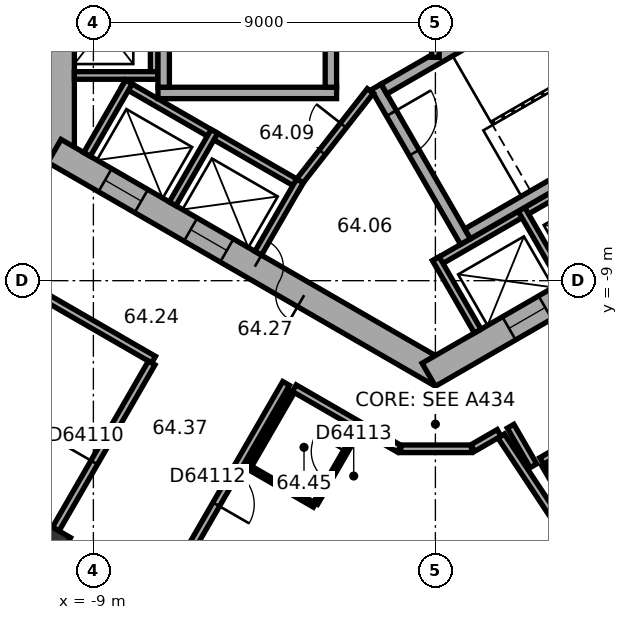
"""IFC4 building model, lengths in metres.
Left out: names, types, materials, properties, quantities, classifications, styles, units other than length and angle.
Written with IfcOpenShell. Run it as: python <this file> out.ifc"""

import sys

from ifc_helpers import new_model, si_unit, direction, frame, frame_2d, origin, origin_2d, place, context, subcontext, project, spatial, rectangle, extrude, element, fill, save


model = new_model("IFC4")
c1 = context("Model", 3, precision=1e-05, world=origin(), true_north=direction((0.0, 1.0)))
c2 = subcontext(c1, "Body", "Model", "MODEL_VIEW")
j1 = project(units=[si_unit("LENGTHUNIT", "METRE"), si_unit("PLANEANGLEUNIT", "RADIAN")], contexts=[c1])
p1 = place(None, origin())
s1 = spatial("IfcSite", under=j1, at=p1, CompositionType="ELEMENT")
p2 = place(p1, origin())
s2 = spatial("IfcBuilding", under=s1, at=p2, CompositionType="ELEMENT")
p3 = place(p2, frame((0.0, 0.0, 259.8)))
s3 = spatial("IfcBuildingStorey", under=s2, at=p3, CompositionType="ELEMENT", Elevation=259.8)
p4 = place(p3, frame((-10.165, -15.84, 0.0), z_axis=(0.0, 0.0, 1.0), x_axis=(0.866025403784, -0.5, 0.0)))
e1 = element("IfcColumn", 1, at=p4, inside=s3, PredefinedType="COLUMN", context=c2, shape_type="SweptSolid", body=[
    extrude(rectangle(XDim=0.9, YDim=0.7, at=origin_2d()), origin(), (0.0, 0.0, 1.0), 3.7),
])
p5 = place(p3, frame((-9.85, 5.889, 0.0), z_axis=(0.0, 0.0, 1.0), x_axis=(0.0, -1.0, 0.0)))
e2 = element("IfcWall", 2, at=p5, inside=s3, PredefinedType="SHEAR", context=c2, shape_type="SweptSolid", body=[
    extrude(rectangle(XDim=11.778, YDim=0.7, at=frame_2d((5.889, 0.0))), origin(), (0.0, 0.0, 1.0), 3.7),
])
p6 = place(p5, frame((5.039, 0.0, 0.0)))
e3 = element("IfcOpeningElement", 3, at=p6, cuts=e2, PredefinedType="OPENING", context=c2, shape_type="SweptSolid", body=[
    extrude(rectangle(XDim=1.1, YDim=2.1, at=frame_2d((0.55, 1.05))), frame((0.0, 0.36, 0.0), z_axis=(0.0, -1.0, 0.0), x_axis=(1.0, 0.0, 0.0)), (0.0, 0.0, 1.0), 0.72),
])
p7 = place(p5, frame((7.639, 0.0, 0.0)))
e4 = element("IfcOpeningElement", 4, at=p7, cuts=e2, PredefinedType="OPENING", context=c2, shape_type="SweptSolid", body=[
    extrude(rectangle(XDim=1.1, YDim=2.1, at=frame_2d((0.55, 1.05))), frame((0.0, 0.36, 0.0), z_axis=(0.0, -1.0, 0.0), x_axis=(1.0, 0.0, 0.0)), (0.0, 0.0, 1.0), 0.72),
])
p8 = place(p3, frame((-10.025, -5.586, 0.0), z_axis=(0.0, 0.0, 1.0), x_axis=(0.866026453023, -0.499998182661, 0.0)))
e5 = element("IfcWall", 5, at=p8, inside=s3, PredefinedType="SHEAR", context=c2, shape_type="SweptSolid", body=[
    extrude(rectangle(XDim=11.778, YDim=0.7, at=frame_2d((5.889, 0.0))), origin(), (0.0, 0.0, 1.0), 3.7),
])
p9 = place(p8, frame((6.089, 0.0, 0.0)))
e6 = element("IfcOpeningElement", 6, at=p9, cuts=e5, PredefinedType="OPENING", context=c2, shape_type="SweptSolid", body=[
    extrude(rectangle(XDim=1.5, YDim=2.1, at=frame_2d((0.75, 1.05))), frame((0.0, 0.36, 0.0), z_axis=(0.0, -1.0, 0.0), x_axis=(1.0, 0.0, 0.0)), (0.0, 0.0, 1.0), 0.72),
])
p10 = place(p8, frame((1.539, 0.0, 0.0)))
e7 = element("IfcOpeningElement", 7, at=p10, cuts=e5, PredefinedType="OPENING", context=c2, shape_type="SweptSolid", body=[
    extrude(rectangle(XDim=1.1, YDim=2.1, at=frame_2d((0.55, 1.05))), frame((0.0, 0.36, 0.0), z_axis=(0.0, -1.0, 0.0), x_axis=(1.0, 0.0, 0.0)), (0.0, 0.0, 1.0), 0.72),
])
p11 = place(p8, frame((4.139, 0.0, 0.0)))
e8 = element("IfcOpeningElement", 8, at=p11, cuts=e5, PredefinedType="OPENING", context=c2, shape_type="SweptSolid", body=[
    extrude(rectangle(XDim=1.1, YDim=2.1, at=frame_2d((0.55, 1.05))), frame((0.0, 0.36, 0.0), z_axis=(0.0, -1.0, 0.0), x_axis=(1.0, 0.0, 0.0)), (0.0, 0.0, 1.0), 0.72),
])
p12 = place(p3, frame((-0.175, -11.475, 0.0), z_axis=(0.0, 0.0, 1.0), x_axis=(0.866026453023, 0.499998182661, 0.0)))
e9 = element("IfcWall", 9, at=p12, inside=s3, PredefinedType="SHEAR", context=c2, shape_type="SweptSolid", body=[
    extrude(rectangle(XDim=11.778, YDim=0.7, at=frame_2d((5.889, 0.0))), origin(), (0.0, 0.0, 1.0), 3.7),
])
p13 = place(p12, frame((2.439, 0.0, 0.0)))
e10 = element("IfcOpeningElement", 10, at=p13, cuts=e9, PredefinedType="OPENING", context=c2, shape_type="SweptSolid", body=[
    extrude(rectangle(XDim=1.1, YDim=2.1, at=frame_2d((0.55, 1.05))), frame((0.0, 0.36, 0.0), z_axis=(0.0, -1.0, 0.0), x_axis=(1.0, 0.0, 0.0)), (0.0, 0.0, 1.0), 0.72),
])
p14 = place(p12, frame((5.039, 0.0, 0.0)))
e11 = element("IfcOpeningElement", 11, at=p14, cuts=e9, PredefinedType="OPENING", context=c2, shape_type="SweptSolid", body=[
    extrude(rectangle(XDim=1.1, YDim=2.1, at=frame_2d((0.55, 1.05))), frame((0.0, 0.36, 0.0), z_axis=(0.0, -1.0, 0.0), x_axis=(1.0, 0.0, 0.0)), (0.0, 0.0, 1.0), 0.72),
])
p15 = place(p12, frame((7.639, 0.0, 0.0)))
e12 = element("IfcOpeningElement", 12, at=p15, cuts=e9, PredefinedType="OPENING", context=c2, shape_type="SweptSolid", body=[
    extrude(rectangle(XDim=1.1, YDim=2.1, at=frame_2d((0.55, 1.05))), frame((0.0, 0.36, 0.0), z_axis=(0.0, -1.0, 0.0), x_axis=(1.0, 0.0, 0.0)), (0.0, 0.0, 1.0), 0.72),
])
p16 = place(p3, frame((-16.626, -12.629, 0.0), z_axis=(0.0, 0.0, 1.0), x_axis=(0.866026460444, -0.499998169808, 0.0)))
e13 = element("IfcWall", 13, at=p16, inside=s3, PredefinedType="STANDARD", context=c2, shape_type="SweptSolid", body=[
    extrude(rectangle(XDim=17.731, YDim=0.2, at=frame_2d((8.866, 0.0))), origin(), (0.0, 0.0, 1.0), 3.7),
])
p17 = place(p16, frame((1.203, 0.0, 0.9)))
e14 = element("IfcOpeningElement", 14, at=p17, cuts=e13, PredefinedType="OPENING", context=c2, shape_type="SweptSolid", body=[
    extrude(rectangle(XDim=2.0, YDim=2.0, at=frame_2d((1.0, 1.0))), frame((0.0, 0.11, 0.0), z_axis=(0.0, -1.0, 0.0), x_axis=(1.0, 0.0, 0.0)), (0.0, 0.0, 1.0), 0.22),
])
p18 = place(p16, frame((4.535, 0.0, 0.9)))
e15 = element("IfcOpeningElement", 15, at=p18, cuts=e13, PredefinedType="OPENING", context=c2, shape_type="SweptSolid", body=[
    extrude(rectangle(XDim=2.0, YDim=2.0, at=frame_2d((1.0, 1.0))), frame((0.0, 0.11, 0.0), z_axis=(0.0, -1.0, 0.0), x_axis=(1.0, 0.0, 0.0)), (0.0, 0.0, 1.0), 0.22),
])
p19 = place(p16, frame((7.867, 0.0, 0.9)))
e16 = element("IfcOpeningElement", 16, at=p19, cuts=e13, PredefinedType="OPENING", context=c2, shape_type="SweptSolid", body=[
    extrude(rectangle(XDim=2.0, YDim=2.0, at=frame_2d((1.0, 1.0))), frame((0.0, 0.11, 0.0), z_axis=(0.0, -1.0, 0.0), x_axis=(1.0, 0.0, 0.0)), (0.0, 0.0, 1.0), 0.22),
])
p20 = place(p16, frame((11.198, 0.0, 0.9)))
e17 = element("IfcOpeningElement", 17, at=p20, cuts=e13, PredefinedType="OPENING", context=c2, shape_type="SweptSolid", body=[
    extrude(rectangle(XDim=2.0, YDim=2.0, at=frame_2d((1.0, 1.0))), frame((0.0, 0.11, 0.0), z_axis=(0.0, -1.0, 0.0), x_axis=(1.0, 0.0, 0.0)), (0.0, 0.0, 1.0), 0.22),
])
p21 = place(p16, frame((14.53, 0.0, 0.9)))
e18 = element("IfcOpeningElement", 18, at=p21, cuts=e13, PredefinedType="OPENING", context=c2, shape_type="SweptSolid", body=[
    extrude(rectangle(XDim=2.0, YDim=2.0, at=frame_2d((1.0, 1.0))), frame((0.0, 0.11, 0.0), z_axis=(0.0, -1.0, 0.0), x_axis=(1.0, 0.0, 0.0)), (0.0, 0.0, 1.0), 0.22),
])
p22 = place(p3, frame((2.58, -21.377, 0.0), z_axis=(0.0, 0.0, 1.0), x_axis=(0.833888592176, 0.551932800112, 0.0)))
e19 = element("IfcWall", 19, at=p22, inside=s3, PredefinedType="STANDARD", context=c2, shape_type="SweptSolid", body=[
    extrude(rectangle(XDim=17.731, YDim=0.2, at=frame_2d((8.866, 0.0))), origin(), (0.0, 0.0, 1.0), 3.7),
])
p23 = place(p22, frame((1.202, 0.0, 0.9)))
e20 = element("IfcOpeningElement", 20, at=p23, cuts=e19, PredefinedType="OPENING", context=c2, shape_type="SweptSolid", body=[
    extrude(rectangle(XDim=2.0, YDim=2.0, at=frame_2d((1.0, 1.0))), frame((0.0, 0.11, 0.0), z_axis=(0.0, -1.0, 0.0), x_axis=(1.0, 0.0, 0.0)), (0.0, 0.0, 1.0), 0.22),
])
p24 = place(p22, frame((4.533, 0.0, 0.9)))
e21 = element("IfcOpeningElement", 21, at=p24, cuts=e19, PredefinedType="OPENING", context=c2, shape_type="SweptSolid", body=[
    extrude(rectangle(XDim=2.0, YDim=2.0, at=frame_2d((1.0, 1.0))), frame((0.0, 0.11, 0.0), z_axis=(0.0, -1.0, 0.0), x_axis=(1.0, 0.0, 0.0)), (0.0, 0.0, 1.0), 0.22),
])
p25 = place(p22, frame((7.865, 0.0, 0.9)))
e22 = element("IfcOpeningElement", 22, at=p25, cuts=e19, PredefinedType="OPENING", context=c2, shape_type="SweptSolid", body=[
    extrude(rectangle(XDim=2.0, YDim=2.0, at=frame_2d((1.0, 1.0))), frame((0.0, 0.11, 0.0), z_axis=(0.0, -1.0, 0.0), x_axis=(1.0, 0.0, 0.0)), (0.0, 0.0, 1.0), 0.22),
])
p26 = place(p22, frame((11.197, 0.0, 0.9)))
e23 = element("IfcOpeningElement", 23, at=p26, cuts=e19, PredefinedType="OPENING", context=c2, shape_type="SweptSolid", body=[
    extrude(rectangle(XDim=2.0, YDim=2.0, at=frame_2d((1.0, 1.0))), frame((0.0, 0.11, 0.0), z_axis=(0.0, -1.0, 0.0), x_axis=(1.0, 0.0, 0.0)), (0.0, 0.0, 1.0), 0.22),
])
p27 = place(p22, frame((14.528, 0.0, 0.9)))
e24 = element("IfcOpeningElement", 24, at=p27, cuts=e19, PredefinedType="OPENING", context=c2, shape_type="SweptSolid", body=[
    extrude(rectangle(XDim=2.0, YDim=2.0, at=frame_2d((1.0, 1.0))), frame((0.0, 0.11, 0.0), z_axis=(0.0, -1.0, 0.0), x_axis=(1.0, 0.0, 0.0)), (0.0, 0.0, 1.0), 0.22),
])
p28 = place(p3, frame((-7.4, 4.3, 0.0), z_axis=(0.0, 0.0, 1.0), x_axis=(0.0, -1.0, 0.0)))
e25 = element("IfcWall", 25, at=p28, inside=s3, PredefinedType="PARTITIONING", context=c2, shape_type="SweptSolid", body=[
    extrude(rectangle(XDim=8.0, YDim=0.2, at=frame_2d((4.0, 0.0))), origin(), (0.0, 0.0, 1.0), 3.42),
])
p29 = place(p3, frame((-7.3, -3.6, 0.0), z_axis=(0.0, 0.0, 1.0), x_axis=(-1.0, 0.0, 0.0)))
e26 = element("IfcWall", 26, at=p29, inside=s3, PredefinedType="PARTITIONING", context=c2, shape_type="SweptSolid", body=[
    extrude(rectangle(XDim=2.2, YDim=0.2, at=frame_2d((1.1, 0.0))), origin(), (0.0, 0.0, 1.0), 3.42),
])
p30 = place(p3, frame((-8.203, -3.809, 0.0), z_axis=(0.0, 0.0, 1.0), x_axis=(0.866028230842, -0.499995103361, 0.0)))
e27 = element("IfcWall", 27, at=p30, inside=s3, PredefinedType="PARTITIONING", context=c2, shape_type="SweptSolid", body=[
    extrude(rectangle(XDim=5.4, YDim=0.2, at=frame_2d((2.7, 0.0))), origin(), (0.0, 0.0, 1.0), 3.42),
])
for number, where, z_axis, x_axis in (
    (28, (-8.067, -3.772, 0.0), (0.0, 0.0, 1.0), (-0.5, -0.866, 0.0)),
    (29, (-5.815, -5.072, 0.0), (0.0, 0.0, 1.0), (-0.5, -0.866, 0.0)),
):
    element("IfcWall", number, at=place(p3, frame(where, z_axis=z_axis, x_axis=x_axis)), inside=s3, PredefinedType="PARTITIONING", context=c2, shape_type="SweptSolid", body=[
        extrude(rectangle(XDim=2.2, YDim=0.2, at=frame_2d((1.1, 0.0))), origin(), (0.0, 0.0, 1.0), 3.42),
    ])
p31 = place(p3, frame((-3.563, -6.372, 0.0), z_axis=(0.0, 0.0, 1.0), x_axis=(-0.499994660107, -0.866028486751, 0.0)))
e30 = element("IfcWall", 30, at=p31, inside=s3, PredefinedType="PARTITIONING", context=c2, shape_type="SweptSolid", body=[
    extrude(rectangle(XDim=2.2, YDim=0.2, at=frame_2d((1.1, 0.0))), origin(), (0.0, 0.0, 1.0), 3.42),
])
p32 = place(p3, frame((-0.024, -8.559, 0.0), z_axis=(0.0, 0.0, 1.0), x_axis=(0.866026010844, 0.49999894854, 0.0)))
e31 = element("IfcWall", 31, at=p32, inside=s3, PredefinedType="PARTITIONING", context=c2, shape_type="SweptSolid", body=[
    extrude(rectangle(XDim=8.0, YDim=0.2, at=frame_2d((4.0, 0.0))), origin(), (0.0, 0.0, 1.0), 3.42),
])
for number, where, z_axis, x_axis in (
    (32, (0.013, -8.422, 0.0), (0.0, 0.0, 1.0), (0.5, -0.866, 0.0)),
    (33, (2.264, -7.122, 0.0), (0.0, 0.0, 1.0), (0.5, -0.866, 0.0)),
):
    element("IfcWall", number, at=place(p3, frame(where, z_axis=z_axis, x_axis=x_axis)), inside=s3, PredefinedType="PARTITIONING", context=c2, shape_type="SweptSolid", body=[
        extrude(rectangle(XDim=2.2, YDim=0.2, at=frame_2d((1.1, 0.0))), origin(), (0.0, 0.0, 1.0), 3.42),
    ])
p33 = place(p3, frame((-2.6, -4.06, 0.0), z_axis=(0.0, 0.0, 1.0), x_axis=(-1.0, 0.0, 0.0)))
e34 = element("IfcWall", 34, at=p33, inside=s3, PredefinedType="SHEAR", context=c2, shape_type="SweptSolid", body=[
    extrude(rectangle(XDim=4.7, YDim=0.3, at=frame_2d((2.35, 0.0))), origin(), (0.0, 0.0, 1.0), 3.42),
])
for number, where, z_axis, x_axis in (
    (35, (-2.75, 3.15, 0.0), (0.0, 0.0, 1.0), (0.0, -1.0, 0.0)),
    (36, (-7.15, 3.15, 0.0), (0.0, 0.0, 1.0), (0.0, -1.0, 0.0)),
):
    element("IfcWall", number, at=place(p3, frame(where, z_axis=z_axis, x_axis=x_axis)), inside=s3, PredefinedType="SHEAR", context=c2, shape_type="SweptSolid", body=[
        extrude(rectangle(XDim=7.06, YDim=0.3, at=frame_2d((3.53, 0.0))), origin(), (0.0, 0.0, 1.0), 3.42),
    ])
p34 = place(p3, frame((-1.558, -3.902, 0.0), z_axis=(0.0, 0.0, 1.0), x_axis=(0.499977259774, -0.866038532462, 0.0)))
e37 = element("IfcWall", 37, at=p34, inside=s3, PredefinedType="SHEAR", context=c2, shape_type="SweptSolid", body=[
    extrude(rectangle(XDim=4.7, YDim=0.3, at=frame_2d((2.35, 0.0))), origin(), (0.0, 0.0, 1.0), 3.42),
])
p35 = place(p34, frame((0.8, 0.0, 0.0)))
e38 = element("IfcOpeningElement", 38, at=p35, cuts=e37, PredefinedType="OPENING", context=c2, shape_type="SweptSolid", body=[
    extrude(rectangle(XDim=1.2, YDim=2.1, at=frame_2d((0.6, 1.05))), frame((0.0, 0.16, 0.0), z_axis=(0.0, -1.0, 0.0), x_axis=(1.0, 0.0, 0.0)), (0.0, 0.0, 1.0), 0.32),
])
for number, where, z_axis, x_axis in (
    (39, (-1.353, -3.957, 0.0), (0.0, 0.0, 1.0), (0.866, 0.5, 0.0)),
    (40, (0.847, -7.767, 0.0), (0.0, 0.0, 1.0), (0.866, 0.5, 0.0)),
):
    element("IfcWall", number, at=place(p3, frame(where, z_axis=z_axis, x_axis=x_axis)), inside=s3, PredefinedType="SHEAR", context=c2, shape_type="SweptSolid", body=[
        extrude(rectangle(XDim=7.06, YDim=0.3, at=frame_2d((3.53, 0.0))), origin(), (0.0, 0.0, 1.0), 3.42),
    ])
p36 = place(p3, frame((-1.712, -4.008, 0.0), z_axis=(0.0, 0.0, 1.0), x_axis=(-0.616549420702, -0.787316208287, 0.0)))
e41 = element("IfcWall", 41, at=p36, inside=s3, PredefinedType="PARTITIONING", context=c2, shape_type="SweptSolid", body=[
    extrude(rectangle(XDim=3.002, YDim=0.2, at=frame_2d((1.501, 0.0))), origin(), (0.0, 0.0, 1.0), 3.42),
])
p37 = place(p36, frame((1.15, 0.0, 0.0)))
e42 = element("IfcOpeningElement", 42, at=p37, cuts=e41, PredefinedType="OPENING", context=c2, shape_type="SweptSolid", body=[
    extrude(rectangle(XDim=0.9, YDim=2.1, at=frame_2d((0.45, 1.05))), frame((0.0, 0.11, 0.0), z_axis=(0.0, -1.0, 0.0), x_axis=(1.0, 0.0, 0.0)), (0.0, 0.0, 1.0), 0.22),
])
p38 = place(p3, frame((0.0, -3.122, 0.0), z_axis=(0.0, 0.0, 1.0), x_axis=(0.0, 1.0, 0.0)))
e43 = element("IfcWall", 43, at=p38, inside=s3, PredefinedType="PARTITIONING", context=c2, shape_type="SweptSolid", body=[
    extrude(rectangle(XDim=6.245, YDim=0.2, at=frame_2d((3.122, 0.0))), origin(), (0.0, 0.0, 1.0), 3.42),
])
p39 = place(p3, frame((-11.501, -8.719, 0.0), z_axis=(0.0, 0.0, 1.0), x_axis=(0.866024434742, -0.500001678427, 0.0)))
e44 = element("IfcWall", 44, at=p39, inside=s3, PredefinedType="PARTITIONING", context=c2, shape_type="SweptSolid", body=[
    extrude(rectangle(XDim=4.718, YDim=0.2, at=frame_2d((2.359, 0.0))), origin(), (0.0, 0.0, 1.0), 3.42),
])
p40 = place(p3, frame((-9.99, -15.537, 0.0), z_axis=(0.0, 0.0, 1.0), x_axis=(0.499966611936, 0.866044679534, 0.0)))
e45 = element("IfcWall", 45, at=p40, inside=s3, PredefinedType="PARTITIONING", context=c2, shape_type="SweptSolid", body=[
    extrude(rectangle(XDim=5.049, YDim=0.2, at=frame_2d((2.524, 0.0))), origin(), (0.0, 0.0, 1.0), 2.87),
])
p41 = place(p40, frame((2.024, 0.0, 0.0)))
e46 = element("IfcOpeningElement", 46, at=p41, cuts=e45, PredefinedType="OPENING", context=c2, shape_type="SweptSolid", body=[
    extrude(rectangle(XDim=1.0, YDim=2.1, at=frame_2d((0.5, 1.05))), frame((0.0, 0.11, 0.0), z_axis=(0.0, -1.0, 0.0), x_axis=(1.0, 0.0, 0.0)), (0.0, 0.0, 1.0), 0.22),
])
p42 = place(p3, frame((-7.105, -17.202, 0.0), z_axis=(0.0, 0.0, 1.0), x_axis=(0.499988692146, 0.866031932279, 0.0)))
e47 = element("IfcWall", 47, at=p42, inside=s3, PredefinedType="PARTITIONING", context=c2, shape_type="SweptSolid", body=[
    extrude(rectangle(XDim=6.35, YDim=0.2, at=frame_2d((3.175, 0.0))), origin(), (0.0, 0.0, 1.0), 3.42),
])
p43 = place(p42, frame((2.675, 0.0, 0.0)))
e48 = element("IfcOpeningElement", 48, at=p43, cuts=e47, PredefinedType="OPENING", context=c2, shape_type="SweptSolid", body=[
    extrude(rectangle(XDim=1.0, YDim=2.1, at=frame_2d((0.5, 1.05))), frame((0.0, 0.11, 0.0), z_axis=(0.0, -1.0, 0.0), x_axis=(1.0, 0.0, 0.0)), (0.0, 0.0, 1.0), 0.22),
])
p44 = place(p3, frame((-4.913, -13.906, 0.0), z_axis=(0.0, 0.0, 1.0), x_axis=(0.500031774688, 0.866007057882, 0.0)))
e49 = element("IfcWall", 49, at=p44, inside=s3, PredefinedType="PARTITIONING", context=c2, shape_type="SweptSolid", body=[
    extrude(rectangle(XDim=2.3, YDim=0.12, at=frame_2d((1.15, 0.0))), origin(), (0.0, 0.0, 1.0), 3.42),
])
p45 = place(p3, frame((-3.713, -11.828, 0.0), z_axis=(0.0, 0.0, 1.0), x_axis=(0.866026321388, -0.499998410661, 0.0)))
e50 = element("IfcWall", 50, at=p45, inside=s3, PredefinedType="PARTITIONING", context=c2, shape_type="SweptSolid", body=[
    extrude(rectangle(XDim=3.191, YDim=0.2, at=frame_2d((1.595, 0.0))), origin(), (0.0, 0.0, 1.0), 3.42),
])
p46 = place(p3, frame((-3.181, -14.906, 0.0), z_axis=(0.0, 0.0, 1.0), x_axis=(-0.866043088465, 0.499969367985, 0.0)))
e51 = element("IfcWall", 51, at=p46, inside=s3, PredefinedType="PARTITIONING", context=c2, shape_type="SweptSolid", body=[
    extrude(rectangle(XDim=1.94, YDim=0.12, at=frame_2d((0.97, 0.0))), origin(), (0.0, 0.0, 1.0), 3.42),
])
p47 = place(p3, frame((-2.031, -12.915, 0.0), z_axis=(0.0, 0.0, 1.0), x_axis=(-0.49994888933, -0.866054910533, 0.0)))
e52 = element("IfcWall", 52, at=p47, inside=s3, PredefinedType="PARTITIONING", context=c2, shape_type="SweptSolid", body=[
    extrude(rectangle(XDim=2.24, YDim=0.12, at=frame_2d((1.12, 0.0))), origin(), (0.0, 0.0, 1.0), 3.42),
])
p48 = place(p47, frame((0.67, 0.0, 0.0)))
e53 = element("IfcOpeningElement", 53, at=p48, cuts=e52, PredefinedType="OPENING", context=c2, shape_type="SweptSolid", body=[
    extrude(rectangle(XDim=0.9, YDim=2.1, at=frame_2d((0.45, 1.05))), frame((0.0, 0.07, 0.0), z_axis=(0.0, -1.0, 0.0), x_axis=(1.0, 0.0, 0.0)), (0.0, 0.0, 1.0), 0.14),
])
p49 = place(p3, frame((-0.91, -13.423, 0.0), z_axis=(0.0, 0.0, 1.0), x_axis=(1.0, 0.0, 0.0)))
e54 = element("IfcWall", 54, at=p49, inside=s3, PredefinedType="PARTITIONING", context=c2, shape_type="SweptSolid", body=[
    extrude(rectangle(XDim=1.86, YDim=0.2, at=frame_2d((0.93, 0.0))), origin(), (0.0, 0.0, 1.0), 3.42),
])
p50 = place(p3, frame((0.985, -13.403, 0.0), z_axis=(0.0, 0.0, 1.0), x_axis=(0.866032814021, 0.499987164874, 0.0)))
e55 = element("IfcWall", 55, at=p50, inside=s3, PredefinedType="PARTITIONING", context=c2, shape_type="SweptSolid", body=[
    extrude(rectangle(XDim=0.798, YDim=0.2, at=frame_2d((0.399, 0.0))), origin(), (0.0, 0.0, 1.0), 3.42),
])
p51 = place(p3, frame((1.979, -12.829, 0.0), z_axis=(0.0, 0.0, 1.0), x_axis=(0.500074377092, -0.865982457891, 0.0)))
e56 = element("IfcWall", 56, at=p51, inside=s3, PredefinedType="PARTITIONING", context=c2, shape_type="SweptSolid", body=[
    extrude(rectangle(XDim=1.201, YDim=0.2, at=frame_2d((0.601, 0.0))), origin(), (0.0, 0.0, 1.0), 3.42),
])
p52 = place(p3, frame((2.796, -13.744, 0.0), z_axis=(0.0, 0.0, 1.0), x_axis=(0.866018331238, 0.50001224981, 0.0)))
e57 = element("IfcWall", 57, at=p52, inside=s3, PredefinedType="PARTITIONING", context=c2, shape_type="SweptSolid", body=[
    extrude(rectangle(XDim=4.4, YDim=0.2, at=frame_2d((2.2, 0.0))), origin(), (0.0, 0.0, 1.0), 3.42),
])
p53 = place(p3, frame((4.796, -17.208, 0.0), z_axis=(0.0, 0.0, 1.0), x_axis=(-0.500043961785, 0.866000020948, 0.0)))
e58 = element("IfcWall", 58, at=p53, inside=s3, PredefinedType="PARTITIONING", context=c2, shape_type="SweptSolid", body=[
    extrude(rectangle(XDim=3.9, YDim=0.12, at=frame_2d((1.95, 0.0))), origin(), (0.0, 0.0, 1.0), 3.42),
])
p54 = place(p3, frame((5.364, -18.575, 0.0), z_axis=(0.0, 0.0, 1.0), x_axis=(-0.55195757761, 0.833872191957, 0.0)))
e59 = element("IfcWall", 59, at=p54, inside=s3, PredefinedType="PARTITIONING", context=c2, shape_type="SweptSolid", body=[
    extrude(rectangle(XDim=6.581, YDim=0.2, at=frame_2d((3.291, 0.0))), origin(), (0.0, 0.0, 1.0), 3.42),
])
p55 = place(p9, origin())
e60 = element("IfcDoor", 60, at=p55, inside=s3, OperationType="DOUBLE_DOOR_SINGLE_SWING", PredefinedType="DOOR", context=c2, shape_type="SweptSolid", body=[
    extrude(rectangle(XDim=1.5, YDim=2.1, at=frame_2d((0.75, 1.05))), frame((0.0, 0.025, 0.0), z_axis=(0.0, -1.0, 0.0), x_axis=(1.0, 0.0, 0.0)), (0.0, 0.0, 1.0), 0.05),
])
fill(e6, e60)
p56 = place(p35, origin())
e61 = element("IfcDoor", 61, at=p56, inside=s3, OperationType="SINGLE_SWING_RIGHT", PredefinedType="DOOR", context=c2, shape_type="SweptSolid", body=[
    extrude(rectangle(XDim=1.2, YDim=2.1, at=frame_2d((0.6, 1.05))), frame((0.0, 0.025, 0.0), z_axis=(0.0, -1.0, 0.0), x_axis=(1.0, 0.0, 0.0)), (0.0, 0.0, 1.0), 0.05),
])
fill(e38, e61)
p57 = place(p37, origin())
e62 = element("IfcDoor", 62, at=p57, inside=s3, OperationType="SINGLE_SWING_LEFT", PredefinedType="DOOR", context=c2, shape_type="SweptSolid", body=[
    extrude(rectangle(XDim=0.9, YDim=2.1, at=frame_2d((0.45, 1.05))), frame((0.0, 0.025, 0.0), z_axis=(0.0, -1.0, 0.0), x_axis=(1.0, 0.0, 0.0)), (0.0, 0.0, 1.0), 0.05),
])
fill(e42, e62)
p58 = place(p10, origin())
e63 = element("IfcDoor", 63, at=p58, inside=s3, OperationType="DOUBLE_DOOR_SLIDING", PredefinedType="DOOR", context=c2, shape_type="SweptSolid", body=[
    extrude(rectangle(XDim=1.1, YDim=2.1, at=frame_2d((0.55, 1.05))), frame((0.0, 0.025, 0.0), z_axis=(0.0, -1.0, 0.0), x_axis=(1.0, 0.0, 0.0)), (0.0, 0.0, 1.0), 0.05),
])
fill(e7, e63)
p59 = place(p11, origin())
e64 = element("IfcDoor", 64, at=p59, inside=s3, OperationType="DOUBLE_DOOR_SLIDING", PredefinedType="DOOR", context=c2, shape_type="SweptSolid", body=[
    extrude(rectangle(XDim=1.1, YDim=2.1, at=frame_2d((0.55, 1.05))), frame((0.0, 0.025, 0.0), z_axis=(0.0, -1.0, 0.0), x_axis=(1.0, 0.0, 0.0)), (0.0, 0.0, 1.0), 0.05),
])
fill(e8, e64)
p60 = place(p13, origin())
e65 = element("IfcDoor", 65, at=p60, inside=s3, OperationType="DOUBLE_DOOR_SLIDING", PredefinedType="DOOR", context=c2, shape_type="SweptSolid", body=[
    extrude(rectangle(XDim=1.1, YDim=2.1, at=frame_2d((0.55, 1.05))), frame((0.0, 0.025, 0.0), z_axis=(0.0, -1.0, 0.0), x_axis=(1.0, 0.0, 0.0)), (0.0, 0.0, 1.0), 0.05),
])
fill(e10, e65)
p61 = place(p41, origin())
e66 = element("IfcDoor", 66, at=p61, inside=s3, OperationType="SINGLE_SWING_LEFT", PredefinedType="DOOR", context=c2, shape_type="SweptSolid", body=[
    extrude(rectangle(XDim=1.0, YDim=2.1, at=frame_2d((0.5, 1.05))), frame((0.0, 0.025, 0.0), z_axis=(0.0, -1.0, 0.0), x_axis=(1.0, 0.0, 0.0)), (0.0, 0.0, 1.0), 0.05),
])
fill(e46, e66)
p62 = place(p43, origin())
e67 = element("IfcDoor", 67, at=p62, inside=s3, OperationType="SINGLE_SWING_LEFT", PredefinedType="DOOR", context=c2, shape_type="SweptSolid", body=[
    extrude(rectangle(XDim=1.0, YDim=2.1, at=frame_2d((0.5, 1.05))), frame((0.0, 0.025, 0.0), z_axis=(0.0, -1.0, 0.0), x_axis=(1.0, 0.0, 0.0)), (0.0, 0.0, 1.0), 0.05),
])
fill(e48, e67)
p63 = place(p48, origin())
e68 = element("IfcDoor", 68, at=p63, inside=s3, OperationType="SINGLE_SWING_LEFT", PredefinedType="DOOR", context=c2, shape_type="SweptSolid", body=[
    extrude(rectangle(XDim=0.9, YDim=2.1, at=frame_2d((0.45, 1.05))), frame((0.0, 0.025, 0.0), z_axis=(0.0, -1.0, 0.0), x_axis=(1.0, 0.0, 0.0)), (0.0, 0.0, 1.0), 0.05),
])
fill(e53, e68)
save(model, sys.argv[1])
